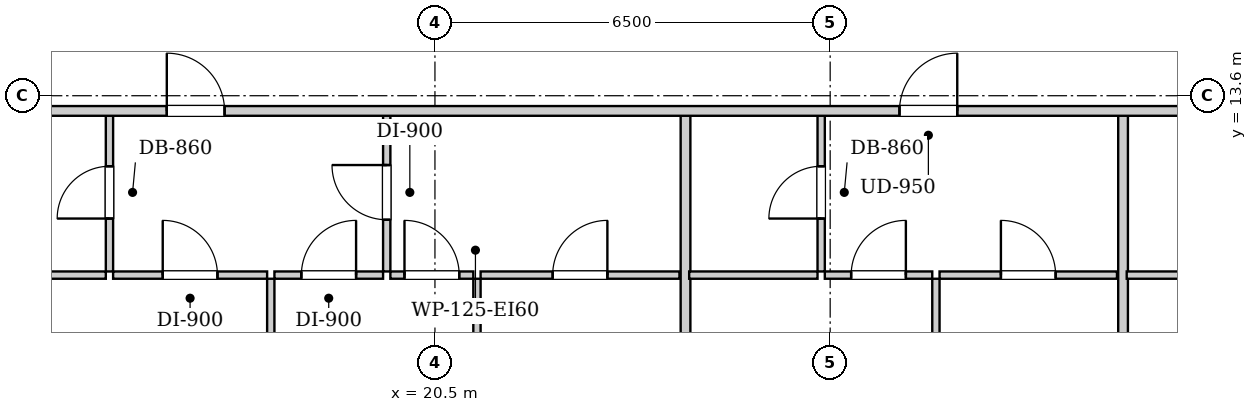
"""IFC4 building model, lengths in metres.
Left out: names, types, materials, properties, quantities, classifications, styles, units other than length and angle.
Written with IfcOpenShell. Run it as: python <this file> out.ifc"""

import sys

from ifc_helpers import new_model, si_unit, direction, frame, frame_2d, origin, place, context, subcontext, project, spatial, rectangle, extrude, element, fill, save


model = new_model("IFC4")
c1 = context("Model", 3, precision=1e-05, world=origin(), true_north=direction((0.0, 1.0)))
c2 = subcontext(c1, "Body", "Model", "MODEL_VIEW")
j1 = project(units=[si_unit("LENGTHUNIT", "METRE"), si_unit("PLANEANGLEUNIT", "RADIAN")], contexts=[c1])
p1 = place(None, origin())
s1 = spatial("IfcSite", under=j1, at=p1, CompositionType="ELEMENT")
p2 = place(p1, origin())
s2 = spatial("IfcBuilding", under=s1, at=p2, CompositionType="ELEMENT")
p3 = place(p2, frame((0.0, 0.0, 54.6)))
s3 = spatial("IfcBuildingStorey", under=s2, at=p3, CompositionType="ELEMENT", Elevation=54.6)
p4 = place(p3, frame((15.147, 10.71, 0.0), z_axis=(0.0, 0.0, 1.0), x_axis=(0.0, 1.0, 0.0)))
e1 = element("IfcWall", 1, at=p4, inside=s3, PredefinedType="PARTITIONING", context=c2, shape_type="SweptSolid", body=[
    extrude(rectangle(XDim=2.6, YDim=0.12, at=frame_2d((1.3, 0.0))), origin(), (0.0, 0.0, 1.0), 2.94),
])
p5 = place(p4, frame((0.87, 0.0, 0.0)))
e2 = element("IfcOpeningElement", 2, at=p5, cuts=e1, PredefinedType="OPENING", context=c2, shape_type="SweptSolid", body=[
    extrude(rectangle(XDim=0.86, YDim=2.05, at=frame_2d((0.43, 1.025))), frame((0.0, 0.07, 0.0), z_axis=(0.0, -1.0, 0.0), x_axis=(1.0, 0.0, 0.0)), (0.0, 0.0, 1.0), 0.14),
])
p6 = place(p3, frame((12.687, 10.65, 0.0), z_axis=(0.0, 0.0, 1.0), x_axis=(1.0, 0.0, 0.0)))
e3 = element("IfcWall", 3, at=p6, inside=s3, PredefinedType="PARTITIONING", context=c2, shape_type="SweptSolid", body=[
    extrude(rectangle(XDim=2.4, YDim=0.12, at=frame_2d((1.2, 0.0))), origin(), (0.0, 0.0, 1.0), 2.94),
])
p7 = place(p3, frame((19.707, 10.71, 0.0), z_axis=(0.0, 0.0, 1.0), x_axis=(0.0, 1.0, 0.0)))
e4 = element("IfcWall", 4, at=p7, inside=s3, PredefinedType="PARTITIONING", context=c2, shape_type="SweptSolid", body=[
    extrude(rectangle(XDim=2.6, YDim=0.12, at=frame_2d((1.3, 0.0))), origin(), (0.0, 0.0, 1.0), 2.94),
])
p8 = place(p7, frame((0.85, 0.0, 0.0)))
e5 = element("IfcOpeningElement", 5, at=p8, cuts=e4, PredefinedType="OPENING", context=c2, shape_type="SweptSolid", body=[
    extrude(rectangle(XDim=0.9, YDim=2.05, at=frame_2d((0.45, 1.025))), frame((0.0, 0.07, 0.0), z_axis=(0.0, -1.0, 0.0), x_axis=(1.0, 0.0, 0.0)), (0.0, 0.0, 1.0), 0.14),
])
p9 = place(p3, frame((15.207, 10.65, 0.0), z_axis=(0.0, 0.0, 1.0), x_axis=(1.0, 0.0, 0.0)))
e6 = element("IfcWall", 6, at=p9, inside=s3, PredefinedType="PARTITIONING", context=c2, shape_type="SweptSolid", body=[
    extrude(rectangle(XDim=2.533, YDim=0.12, at=frame_2d((1.267, 0.0))), origin(), (0.0, 0.0, 1.0), 2.94),
])
p10 = place(p9, frame((0.816, 0.0, 0.0)))
e7 = element("IfcOpeningElement", 7, at=p10, cuts=e6, PredefinedType="OPENING", context=c2, shape_type="SweptSolid", body=[
    extrude(rectangle(XDim=0.9, YDim=2.05, at=frame_2d((0.45, 1.025))), frame((0.0, 0.07, 0.0), z_axis=(0.0, -1.0, 0.0), x_axis=(1.0, 0.0, 0.0)), (0.0, 0.0, 1.0), 0.14),
])
p11 = place(p3, frame((17.86, 10.65, 0.0), z_axis=(0.0, 0.0, 1.0), x_axis=(1.0, 0.0, 0.0)))
e8 = element("IfcWall", 8, at=p11, inside=s3, PredefinedType="PARTITIONING", context=c2, shape_type="SweptSolid", body=[
    extrude(rectangle(XDim=1.787, YDim=0.12, at=frame_2d((0.894, 0.0))), origin(), (0.0, 0.0, 1.0), 2.94),
])
p12 = place(p11, frame((0.443, 0.0, 0.0)))
e9 = element("IfcOpeningElement", 9, at=p12, cuts=e8, PredefinedType="OPENING", context=c2, shape_type="SweptSolid", body=[
    extrude(rectangle(XDim=0.9, YDim=2.05, at=frame_2d((0.45, 1.025))), frame((0.0, 0.07, 0.0), z_axis=(0.0, -1.0, 0.0), x_axis=(1.0, 0.0, 0.0)), (0.0, 0.0, 1.0), 0.14),
])
p13 = place(p3, frame((19.767, 10.65, 0.0), z_axis=(0.0, 0.0, 1.0), x_axis=(1.0, 0.0, 0.0)))
e10 = element("IfcWall", 10, at=p13, inside=s3, PredefinedType="PARTITIONING", context=c2, shape_type="SweptSolid", body=[
    extrude(rectangle(XDim=1.364, YDim=0.12, at=frame_2d((0.682, 0.0))), origin(), (0.0, 0.0, 1.0), 2.94),
])
p14 = place(p13, frame((0.232, 0.0, 0.0)))
e11 = element("IfcOpeningElement", 11, at=p14, cuts=e10, PredefinedType="OPENING", context=c2, shape_type="SweptSolid", body=[
    extrude(rectangle(XDim=0.9, YDim=2.05, at=frame_2d((0.45, 1.025))), frame((0.0, 0.07, 0.0), z_axis=(0.0, -1.0, 0.0), x_axis=(1.0, 0.0, 0.0)), (0.0, 0.0, 1.0), 0.14),
])
p15 = place(p3, frame((21.251, 10.65, 0.0), z_axis=(0.0, 0.0, 1.0), x_axis=(1.0, 0.0, 0.0)))
e12 = element("IfcWall", 12, at=p15, inside=s3, PredefinedType="PARTITIONING", context=c2, shape_type="SweptSolid", body=[
    extrude(rectangle(XDim=3.27, YDim=0.12, at=frame_2d((1.635, 0.0))), origin(), (0.0, 0.0, 1.0), 2.94),
])
p16 = place(p15, frame((1.185, 0.0, 0.0)))
e13 = element("IfcOpeningElement", 13, at=p16, cuts=e12, PredefinedType="OPENING", context=c2, shape_type="SweptSolid", body=[
    extrude(rectangle(XDim=0.9, YDim=2.05, at=frame_2d((0.45, 1.025))), frame((0.0, 0.07, 0.0), z_axis=(0.0, -1.0, 0.0), x_axis=(1.0, 0.0, 0.0)), (0.0, 0.0, 1.0), 0.14),
])
p17 = place(p3, frame((17.8, 0.28, 0.0), z_axis=(0.0, 0.0, 1.0), x_axis=(0.0, 1.0, 0.0)))
e14 = element("IfcWall", 14, at=p17, inside=s3, PredefinedType="PARTITIONING", context=c2, shape_type="SweptSolid", body=[
    extrude(rectangle(XDim=10.31, YDim=0.12, at=frame_2d((5.155, 0.0))), origin(), (0.0, 0.0, 1.0), 2.232),
])
p18 = place(p17, frame((4.69, 0.0, 0.0)))
e15 = element("IfcOpeningElement", 15, at=p18, cuts=e14, PredefinedType="OPENING", context=c2, shape_type="SweptSolid", body=[
    extrude(rectangle(XDim=0.9, YDim=2.05, at=frame_2d((0.45, 1.025))), frame((0.0, 0.07, 0.0), z_axis=(0.0, -1.0, 0.0), x_axis=(1.0, 0.0, 0.0)), (0.0, 0.0, 1.0), 0.14),
])
p19 = place(p3, frame((21.191, 0.28, 0.0), z_axis=(0.0, 0.0, 1.0), x_axis=(0.0, 1.0, 0.0)))
e16 = element("IfcWall", 16, at=p19, inside=s3, PredefinedType="PARTITIONING", context=c2, shape_type="SweptSolid", body=[
    extrude(rectangle(XDim=10.31, YDim=0.12, at=frame_2d((5.155, 0.0))), origin(), (0.0, 0.0, 1.0), 2.94),
])
p20 = place(p19, frame((4.69, 0.0, 0.0)))
e17 = element("IfcOpeningElement", 17, at=p20, cuts=e16, PredefinedType="OPENING", context=c2, shape_type="SweptSolid", body=[
    extrude(rectangle(XDim=0.9, YDim=2.05, at=frame_2d((0.45, 1.025))), frame((0.0, 0.07, 0.0), z_axis=(0.0, -1.0, 0.0), x_axis=(1.0, 0.0, 0.0)), (0.0, 0.0, 1.0), 0.14),
])
p21 = place(p3, frame((24.621, 0.28, 0.0), z_axis=(0.0, 0.0, 1.0), x_axis=(0.0, 1.0, 0.0)))
e18 = element("IfcWall", 18, at=p21, inside=s3, PredefinedType="PARTITIONING", context=c2, shape_type="SweptSolid", body=[
    extrude(rectangle(XDim=13.03, YDim=0.16, at=frame_2d((6.515, 0.0))), origin(), (0.0, 0.0, 1.0), 2.94),
])
p22 = place(p3, frame((26.852, 10.71, 0.0), z_axis=(0.0, 0.0, 1.0), x_axis=(0.0, 1.0, 0.0)))
e19 = element("IfcWall", 19, at=p22, inside=s3, PredefinedType="PARTITIONING", context=c2, shape_type="SweptSolid", body=[
    extrude(rectangle(XDim=2.6, YDim=0.12, at=frame_2d((1.3, 0.0))), origin(), (0.0, 0.0, 1.0), 2.94),
])
p23 = place(p22, frame((0.87, 0.0, 0.0)))
e20 = element("IfcOpeningElement", 20, at=p23, cuts=e19, PredefinedType="OPENING", context=c2, shape_type="SweptSolid", body=[
    extrude(rectangle(XDim=0.86, YDim=2.05, at=frame_2d((0.43, 1.025))), frame((0.0, 0.07, 0.0), z_axis=(0.0, -1.0, 0.0), x_axis=(1.0, 0.0, 0.0)), (0.0, 0.0, 1.0), 0.14),
])
p24 = place(p3, frame((24.681, 10.65, 0.0), z_axis=(0.0, 0.0, 1.0), x_axis=(1.0, 0.0, 0.0)))
e21 = element("IfcWall", 21, at=p24, inside=s3, PredefinedType="PARTITIONING", context=c2, shape_type="SweptSolid", body=[
    extrude(rectangle(XDim=2.111, YDim=0.12, at=frame_2d((1.056, 0.0))), origin(), (0.0, 0.0, 1.0), 2.94),
])
p25 = place(p3, frame((26.912, 10.65, 0.0), z_axis=(0.0, 0.0, 1.0), x_axis=(1.0, 0.0, 0.0)))
e22 = element("IfcWall", 22, at=p25, inside=s3, PredefinedType="PARTITIONING", context=c2, shape_type="SweptSolid", body=[
    extrude(rectangle(XDim=1.767, YDim=0.12, at=frame_2d((0.883, 0.0))), origin(), (0.0, 0.0, 1.0), 2.94),
])
p26 = place(p25, frame((0.433, 0.0, 0.0)))
e23 = element("IfcOpeningElement", 23, at=p26, cuts=e22, PredefinedType="OPENING", context=c2, shape_type="SweptSolid", body=[
    extrude(rectangle(XDim=0.9, YDim=2.05, at=frame_2d((0.45, 1.025))), frame((0.0, 0.07, 0.0), z_axis=(0.0, -1.0, 0.0), x_axis=(1.0, 0.0, 0.0)), (0.0, 0.0, 1.0), 0.14),
])
p27 = place(p3, frame((28.799, 10.65, 0.0), z_axis=(0.0, 0.0, 1.0), x_axis=(1.0, 0.0, 0.0)))
e24 = element("IfcWall", 24, at=p27, inside=s3, PredefinedType="PARTITIONING", context=c2, shape_type="SweptSolid", body=[
    extrude(rectangle(XDim=2.918, YDim=0.12, at=frame_2d((1.459, 0.0))), origin(), (0.0, 0.0, 1.0), 2.94),
])
p28 = place(p27, frame((1.009, 0.0, 0.0)))
e25 = element("IfcOpeningElement", 25, at=p28, cuts=e24, PredefinedType="OPENING", context=c2, shape_type="SweptSolid", body=[
    extrude(rectangle(XDim=0.9, YDim=2.05, at=frame_2d((0.45, 1.025))), frame((0.0, 0.07, 0.0), z_axis=(0.0, -1.0, 0.0), x_axis=(1.0, 0.0, 0.0)), (0.0, 0.0, 1.0), 0.14),
])
p29 = place(p3, frame((28.739, 0.28, 0.0), z_axis=(0.0, 0.0, 1.0), x_axis=(0.0, 1.0, 0.0)))
e26 = element("IfcWall", 26, at=p29, inside=s3, PredefinedType="PARTITIONING", context=c2, shape_type="SweptSolid", body=[
    extrude(rectangle(XDim=10.31, YDim=0.12, at=frame_2d((5.155, 0.0))), origin(), (0.0, 0.0, 1.0), 2.94),
])
p30 = place(p29, frame((4.69, 0.0, 0.0)))
e27 = element("IfcOpeningElement", 27, at=p30, cuts=e26, PredefinedType="OPENING", context=c2, shape_type="SweptSolid", body=[
    extrude(rectangle(XDim=0.9, YDim=2.05, at=frame_2d((0.45, 1.025))), frame((0.0, 0.07, 0.0), z_axis=(0.0, -1.0, 0.0), x_axis=(1.0, 0.0, 0.0)), (0.0, 0.0, 1.0), 0.14),
])
p31 = place(p3, frame((31.817, 0.28, 0.0), z_axis=(0.0, 0.0, 1.0), x_axis=(0.0, 1.0, 0.0)))
e28 = element("IfcWall", 28, at=p31, inside=s3, PredefinedType="PARTITIONING", context=c2, shape_type="SweptSolid", body=[
    extrude(rectangle(XDim=13.03, YDim=0.16, at=frame_2d((6.515, 0.0))), origin(), (0.0, 0.0, 1.0), 2.94),
])
p32 = place(p3, frame((31.877, 10.65, 0.0), z_axis=(0.0, 0.0, 1.0), x_axis=(1.0, 0.0, 0.0)))
e29 = element("IfcWall", 29, at=p32, inside=s3, PredefinedType="PARTITIONING", context=c2, shape_type="SweptSolid", body=[
    extrude(rectangle(XDim=2.4, YDim=0.12, at=frame_2d((1.2, 0.0))), origin(), (0.0, 0.0, 1.0), 2.94),
])
p33 = place(p3, frame((10.05, 13.35, 0.0), z_axis=(0.0, 0.0, 1.0), x_axis=(1.0, 0.0, 0.0)))
e30 = element("IfcWall", 30, at=p33, inside=s3, PredefinedType="PARTITIONING", context=c2, shape_type="SweptSolid", body=[
    extrude(rectangle(XDim=33.9, YDim=0.16, at=frame_2d((16.95, 0.0))), origin(), (0.0, 0.0, 1.0), 2.94),
])
p34 = place(p33, frame((0.813, 0.0, 0.0)))
e31 = element("IfcOpeningElement", 31, at=p34, cuts=e30, PredefinedType="OPENING", context=c2, shape_type="SweptSolid", body=[
    extrude(rectangle(XDim=0.95, YDim=2.1, at=frame_2d((0.475, 1.05))), frame((0.0, 0.09, 0.0), z_axis=(0.0, -1.0, 0.0), x_axis=(1.0, 0.0, 0.0)), (0.0, 0.0, 1.0), 0.18),
])
p35 = place(p33, frame((6.04, 0.0, 0.0)))
e32 = element("IfcOpeningElement", 32, at=p35, cuts=e30, PredefinedType="OPENING", context=c2, shape_type="SweptSolid", body=[
    extrude(rectangle(XDim=0.95, YDim=2.1, at=frame_2d((0.475, 1.05))), frame((0.0, 0.09, 0.0), z_axis=(0.0, -1.0, 0.0), x_axis=(1.0, 0.0, 0.0)), (0.0, 0.0, 1.0), 0.18),
])
p36 = place(p33, frame((18.09, 0.0, 0.0)))
e33 = element("IfcOpeningElement", 33, at=p36, cuts=e30, PredefinedType="OPENING", context=c2, shape_type="SweptSolid", body=[
    extrude(rectangle(XDim=0.95, YDim=2.1, at=frame_2d((0.475, 1.05))), frame((0.0, 0.09, 0.0), z_axis=(0.0, -1.0, 0.0), x_axis=(1.0, 0.0, 0.0)), (0.0, 0.0, 1.0), 0.18),
])
p37 = place(p33, frame((25.962, 0.0, 0.0)))
e34 = element("IfcOpeningElement", 34, at=p37, cuts=e30, PredefinedType="OPENING", context=c2, shape_type="SweptSolid", body=[
    extrude(rectangle(XDim=0.95, YDim=2.1, at=frame_2d((0.475, 1.05))), frame((0.0, 0.09, 0.0), z_axis=(0.0, -1.0, 0.0), x_axis=(1.0, 0.0, 0.0)), (0.0, 0.0, 1.0), 0.18),
])
p38 = place(p5, origin())
e35 = element("IfcDoor", 35, at=p38, inside=s3, OperationType="SINGLE_SWING_LEFT", PredefinedType="DOOR", context=c2, shape_type="SweptSolid", body=[
    extrude(rectangle(XDim=0.86, YDim=2.05, at=frame_2d((0.43, 1.025))), frame((0.0, 0.025, 0.0), z_axis=(0.0, -1.0, 0.0), x_axis=(1.0, 0.0, 0.0)), (0.0, 0.0, 1.0), 0.05),
])
fill(e2, e35)
p39 = place(p8, origin())
e36 = element("IfcDoor", 36, at=p39, inside=s3, OperationType="SINGLE_SWING_RIGHT", PredefinedType="DOOR", context=c2, shape_type="SweptSolid", body=[
    extrude(rectangle(XDim=0.9, YDim=2.05, at=frame_2d((0.45, 1.025))), frame((0.0, 0.025, 0.0), z_axis=(0.0, -1.0, 0.0), x_axis=(1.0, 0.0, 0.0)), (0.0, 0.0, 1.0), 0.05),
])
fill(e5, e36)
p40 = place(p10, origin())
e37 = element("IfcDoor", 37, at=p40, inside=s3, OperationType="SINGLE_SWING_LEFT", PredefinedType="DOOR", context=c2, shape_type="SweptSolid", body=[
    extrude(rectangle(XDim=0.9, YDim=2.05, at=frame_2d((0.45, 1.025))), frame((0.0, 0.025, 0.0), z_axis=(0.0, -1.0, 0.0), x_axis=(1.0, 0.0, 0.0)), (0.0, 0.0, 1.0), 0.05),
])
fill(e7, e37)
p41 = place(p12, origin())
e38 = element("IfcDoor", 38, at=p41, inside=s3, OperationType="SINGLE_SWING_RIGHT", PredefinedType="DOOR", context=c2, shape_type="SweptSolid", body=[
    extrude(rectangle(XDim=0.9, YDim=2.05, at=frame_2d((0.45, 1.025))), frame((0.0, 0.025, 0.0), z_axis=(0.0, -1.0, 0.0), x_axis=(1.0, 0.0, 0.0)), (0.0, 0.0, 1.0), 0.05),
])
fill(e9, e38)
p42 = place(p14, origin())
e39 = element("IfcDoor", 39, at=p42, inside=s3, OperationType="SINGLE_SWING_LEFT", PredefinedType="DOOR", context=c2, shape_type="SweptSolid", body=[
    extrude(rectangle(XDim=0.9, YDim=2.05, at=frame_2d((0.45, 1.025))), frame((0.0, 0.025, 0.0), z_axis=(0.0, -1.0, 0.0), x_axis=(1.0, 0.0, 0.0)), (0.0, 0.0, 1.0), 0.05),
])
fill(e11, e39)
p43 = place(p16, origin())
e40 = element("IfcDoor", 40, at=p43, inside=s3, OperationType="SINGLE_SWING_RIGHT", PredefinedType="DOOR", context=c2, shape_type="SweptSolid", body=[
    extrude(rectangle(XDim=0.9, YDim=2.05, at=frame_2d((0.45, 1.025))), frame((0.0, 0.025, 0.0), z_axis=(0.0, -1.0, 0.0), x_axis=(1.0, 0.0, 0.0)), (0.0, 0.0, 1.0), 0.05),
])
fill(e13, e40)
p44 = place(p23, origin())
e41 = element("IfcDoor", 41, at=p44, inside=s3, OperationType="SINGLE_SWING_LEFT", PredefinedType="DOOR", context=c2, shape_type="SweptSolid", body=[
    extrude(rectangle(XDim=0.86, YDim=2.05, at=frame_2d((0.43, 1.025))), frame((0.0, 0.025, 0.0), z_axis=(0.0, -1.0, 0.0), x_axis=(1.0, 0.0, 0.0)), (0.0, 0.0, 1.0), 0.05),
])
fill(e20, e41)
p45 = place(p26, origin())
e42 = element("IfcDoor", 42, at=p45, inside=s3, OperationType="SINGLE_SWING_RIGHT", PredefinedType="DOOR", context=c2, shape_type="SweptSolid", body=[
    extrude(rectangle(XDim=0.9, YDim=2.05, at=frame_2d((0.45, 1.025))), frame((0.0, 0.025, 0.0), z_axis=(0.0, -1.0, 0.0), x_axis=(1.0, 0.0, 0.0)), (0.0, 0.0, 1.0), 0.05),
])
fill(e23, e42)
p46 = place(p28, origin())
e43 = element("IfcDoor", 43, at=p46, inside=s3, OperationType="SINGLE_SWING_LEFT", PredefinedType="DOOR", context=c2, shape_type="SweptSolid", body=[
    extrude(rectangle(XDim=0.9, YDim=2.05, at=frame_2d((0.45, 1.025))), frame((0.0, 0.025, 0.0), z_axis=(0.0, -1.0, 0.0), x_axis=(1.0, 0.0, 0.0)), (0.0, 0.0, 1.0), 0.05),
])
fill(e25, e43)
p47 = place(p35, origin())
e44 = element("IfcDoor", 44, at=p47, inside=s3, OperationType="SINGLE_SWING_LEFT", PredefinedType="DOOR", context=c2, shape_type="SweptSolid", body=[
    extrude(rectangle(XDim=0.95, YDim=2.1, at=frame_2d((0.475, 1.05))), frame((0.0, 0.025, 0.0), z_axis=(0.0, -1.0, 0.0), x_axis=(1.0, 0.0, 0.0)), (0.0, 0.0, 1.0), 0.05),
])
fill(e32, e44)
p48 = place(p36, origin())
e45 = element("IfcDoor", 45, at=p48, inside=s3, OperationType="SINGLE_SWING_RIGHT", PredefinedType="DOOR", context=c2, shape_type="SweptSolid", body=[
    extrude(rectangle(XDim=0.95, YDim=2.1, at=frame_2d((0.475, 1.05))), frame((0.0, 0.025, 0.0), z_axis=(0.0, -1.0, 0.0), x_axis=(1.0, 0.0, 0.0)), (0.0, 0.0, 1.0), 0.05),
])
fill(e33, e45)
save(model, sys.argv[1])
